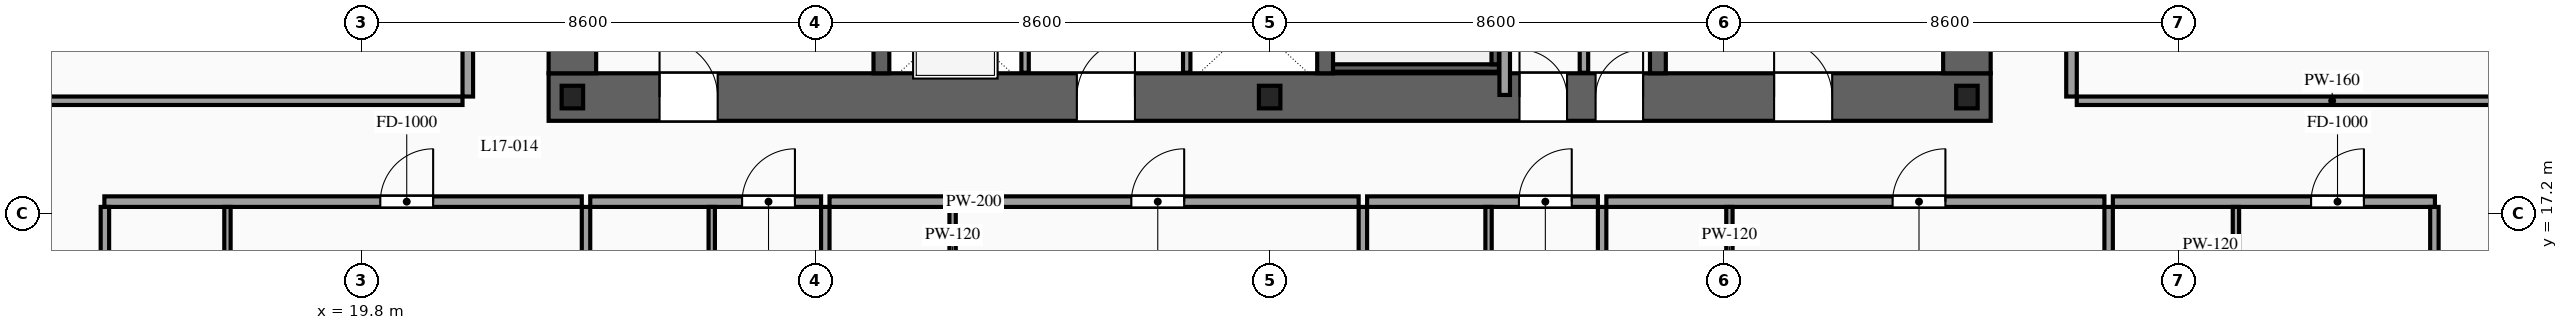
"""IFC4 building model, lengths in metres.
Left out: names, types, materials, properties, quantities, classifications, styles, units other than length and angle.
Written with IfcOpenShell. Run it as: python <this file> out.ifc"""

import sys

from ifc_helpers import new_model, si_unit, direction, frame, frame_2d, origin, origin_2d, place, context, subcontext, project, spatial, rectangle, i_section, extrude, source, transform, mapped, element, fill, save


model = new_model("IFC4")
c1 = context("Model", 3, precision=1e-05, world=origin(), true_north=direction((0.0, 1.0)))
c2 = subcontext(c1, "Body", "Model", "MODEL_VIEW")
j1 = project(units=[si_unit("LENGTHUNIT", "METRE"), si_unit("PLANEANGLEUNIT", "RADIAN")], contexts=[c1])
p1 = place(None, origin())
s1 = spatial("IfcSite", under=j1, at=p1, CompositionType="ELEMENT")
p2 = place(p1, origin())
s2 = spatial("IfcBuilding", under=s1, at=p2, CompositionType="ELEMENT")
p3 = place(p2, frame((0.0, 0.0, 67.6)))
s3 = spatial("IfcBuildingStorey", under=s2, at=p3, CompositionType="ELEMENT", Elevation=67.6)
p4 = place(p3, frame((23.35, 19.4, 0.0), z_axis=(0.0, 0.0, 1.0), x_axis=(1.0, 0.0, 0.0)))
e1 = element("IfcWall", 1, at=p4, inside=s3, PredefinedType="SHEAR", context=c2, shape_type="SweptSolid", body=[
    extrude(rectangle(XDim=27.3, YDim=0.9, at=frame_2d((13.65, 0.0))), origin(), (0.0, 0.0, 1.0), 3.6),
])
p5 = place(p4, frame((2.1, 0.0, 0.0)))
e2 = element("IfcOpeningElement", 2, at=p5, cuts=e1, PredefinedType="OPENING", context=c2, shape_type="SweptSolid", body=[
    extrude(rectangle(XDim=1.1, YDim=2.2, at=frame_2d((0.55, 1.1))), frame((0.0, 0.465, 0.0), z_axis=(0.0, -1.0, 0.0), x_axis=(1.0, 0.0, 0.0)), (0.0, 0.0, 1.0), 0.93),
])
p6 = place(p4, frame((10.0, 0.0, 0.0)))
e3 = element("IfcOpeningElement", 3, at=p6, cuts=e1, PredefinedType="OPENING", context=c2, shape_type="SweptSolid", body=[
    extrude(rectangle(XDim=1.1, YDim=2.2, at=frame_2d((0.55, 1.1))), frame((0.0, 0.465, 0.0), z_axis=(0.0, -1.0, 0.0), x_axis=(1.0, 0.0, 0.0)), (0.0, 0.0, 1.0), 0.93),
])
p7 = place(p4, frame((23.2, 0.0, 0.0)))
e4 = element("IfcOpeningElement", 4, at=p7, cuts=e1, PredefinedType="OPENING", context=c2, shape_type="SweptSolid", body=[
    extrude(rectangle(XDim=1.1, YDim=2.2, at=frame_2d((0.55, 1.1))), frame((0.0, 0.465, 0.0), z_axis=(0.0, -1.0, 0.0), x_axis=(1.0, 0.0, 0.0)), (0.0, 0.0, 1.0), 0.93),
])
p8 = place(p4, frame((19.82, 0.0, 0.0)))
e5 = element("IfcOpeningElement", 5, at=p8, cuts=e1, PredefinedType="OPENING", context=c2, shape_type="SweptSolid", body=[
    extrude(rectangle(XDim=0.9, YDim=2.15, at=frame_2d((0.45, 1.075))), frame((0.0, 0.465, 0.0), z_axis=(0.0, -1.0, 0.0), x_axis=(1.0, 0.0, 0.0)), (0.0, 0.0, 1.0), 0.93),
])
p9 = place(p4, frame((18.38, 0.0, 0.0)))
e6 = element("IfcOpeningElement", 6, at=p9, cuts=e1, PredefinedType="OPENING", context=c2, shape_type="SweptSolid", body=[
    extrude(rectangle(XDim=0.9, YDim=2.15, at=frame_2d((0.45, 1.075))), frame((0.0, 0.465, 0.0), z_axis=(0.0, -1.0, 0.0), x_axis=(1.0, 0.0, 0.0)), (0.0, 0.0, 1.0), 0.93),
])
m1 = source(origin(), c2, "Body", "SweptSolid", [
    extrude(rectangle(XDim=11.9, YDim=0.9, at=frame_2d((5.95, 0.0))), origin(), (0.0, 0.0, 1.0), 3.6),
])
for number, where, z_axis, x_axis in (
    (7, (23.8, 19.85, 0.0), (0.0, 0.0, 1.0), (0.0, 1.0, 0.0)),
    (8, (50.2, 19.85, 0.0), (0.0, 0.0, 1.0), (0.0, 1.0, 0.0)),
):
    element("IfcWall", number, at=place(p3, frame(where, z_axis=z_axis, x_axis=x_axis)), inside=s3, PredefinedType="SHEAR", context=c2, shape_type="MappedRepresentation", body=[
        mapped(m1, transform((0.0, 0.0, 0.0), scale=1.0)),
    ])
m2 = source(origin(), c2, "Body", "SweptSolid", [
    extrude(rectangle(XDim=11.9, YDim=0.3, at=frame_2d((5.95, 0.0))), origin(), (0.0, 0.0, 1.0), 3.6),
])
for number, where, z_axis, x_axis in (
    (9, (29.65, 19.85, 0.0), (0.0, 0.0, 1.0), (0.0, 1.0, 0.0)),
    (10, (38.05, 19.85, 0.0), (0.0, 0.0, 1.0), (0.0, 1.0, 0.0)),
    (11, (44.35, 19.85, 0.0), (0.0, 0.0, 1.0), (0.0, 1.0, 0.0)),
):
    element("IfcWall", number, at=place(p3, frame(where, z_axis=z_axis, x_axis=x_axis)), inside=s3, PredefinedType="SOLIDWALL", context=c2, shape_type="MappedRepresentation", body=[
        mapped(m2, transform((0.0, 0.0, 0.0), scale=1.0)),
    ])
m3 = source(origin(), c2, "Body", "SweptSolid", [
    extrude(i_section(OverallWidth=0.407, OverallDepth=0.428, WebThickness=0.02, FlangeThickness=0.035, at=origin_2d()), origin(), (0.0, 0.0, 1.0), 3.6),
])
for number, where, z_axis, x_axis in (
    (12, (23.8, 19.4, 0.0), (0.0, 0.0, 1.0), (1.0, 0.0, 0.0)),
    (13, (37.0, 19.4, 0.0), (0.0, 0.0, 1.0), (1.0, 0.0, 0.0)),
    (14, (50.2, 19.4, 0.0), (0.0, 0.0, 1.0), (1.0, 0.0, 0.0)),
):
    element("IfcColumn", number, at=place(p3, frame(where, z_axis=z_axis, x_axis=x_axis)), inside=s3, PredefinedType="COLUMN", context=c2, shape_type="MappedRepresentation", body=[
        mapped(m3, transform((0.0, 0.0, 0.0), scale=1.0)),
    ])
p10 = place(p3, frame((32.37, 19.86, 0.0), z_axis=(0.0, 0.0, 1.0), x_axis=(0.0, 1.0, 0.0)))
e15 = element("IfcWall", 15, at=p10, inside=s3, PredefinedType="SOLIDWALL", context=c2, shape_type="SweptSolid", body=[
    extrude(rectangle(XDim=2.04, YDim=0.14, at=frame_2d((1.02, 0.0))), origin(), (0.0, 0.0, 1.0), 3.38),
])
p11 = place(p10, frame((0.47, 0.0, 0.0)))
e16 = element("IfcOpeningElement", 16, at=p11, cuts=e15, PredefinedType="OPENING", context=c2, shape_type="SweptSolid", body=[
    extrude(rectangle(XDim=1.1, YDim=2.2, at=frame_2d((0.55, 1.1))), frame((0.0, 0.085, 0.0), z_axis=(0.0, -1.0, 0.0), x_axis=(1.0, 0.0, 0.0)), (0.0, 0.0, 1.0), 0.17),
])
m4 = source(origin(), c2, "Body", "SweptSolid", [
    extrude(rectangle(XDim=2.04, YDim=0.14, at=frame_2d((1.02, 0.0))), origin(), (0.0, 0.0, 1.0), 3.38),
])
p12 = place(p3, frame((35.43, 19.86, 0.0), z_axis=(0.0, 0.0, 1.0), x_axis=(0.0, 1.0, 0.0)))
e17 = element("IfcWall", 17, at=p12, inside=s3, PredefinedType="SOLIDWALL", context=c2, shape_type="MappedRepresentation", body=[
    mapped(m4, transform((0.0, 0.0, 0.0), scale=1.0)),
])
m5 = source(origin(), c2, "Body", "SweptSolid", [
    extrude(rectangle(XDim=3.14, YDim=0.14, at=frame_2d((1.57, 0.0))), origin(), (0.0, 0.0, 1.0), 3.38),
])
p13 = place(p3, frame((38.2, 19.95, 0.0), z_axis=(0.0, 0.0, 1.0), x_axis=(1.0, 0.0, 0.0)))
e18 = element("IfcWall", 18, at=p13, inside=s3, PredefinedType="SOLIDWALL", context=c2, shape_type="MappedRepresentation", body=[
    mapped(m5, transform((0.0, 0.0, 0.0), scale=1.0)),
])
m6 = source(origin(), c2, "Body", "SweptSolid", [
    extrude(rectangle(XDim=8.94, YDim=0.14, at=frame_2d((4.47, 0.0))), origin(), (0.0, 0.0, 1.0), 3.38),
])
p14 = place(p3, frame((41.27, 20.02, 0.0), z_axis=(0.0, 0.0, 1.0), x_axis=(0.0, 1.0, 0.0)))
e19 = element("IfcWall", 19, at=p14, inside=s3, PredefinedType="SOLIDWALL", context=c2, shape_type="MappedRepresentation", body=[
    mapped(m6, transform((0.0, 0.0, 0.0), scale=1.0)),
])
m7 = source(origin(), c2, "Body", "SweptSolid", [
    extrude(rectangle(XDim=1.34, YDim=0.16, at=frame_2d((0.67, 0.0))), origin(), (0.0, 0.0, 1.0), 3.38),
])
p15 = place(p3, frame((42.95, 19.86, 0.0), z_axis=(0.0, 0.0, 1.0), x_axis=(0.0, 1.0, 0.0)))
e20 = element("IfcWall", 20, at=p15, inside=s3, PredefinedType="PARTITIONING", context=c2, shape_type="MappedRepresentation", body=[
    mapped(m7, transform((0.0, 0.0, 0.0), scale=1.0)),
])
m8 = source(origin(), c2, "Body", "SweptSolid", [
    extrude(rectangle(XDim=6.51, YDim=0.2, at=frame_2d((3.255, 0.0))), origin(), (0.0, 0.0, 1.0), 3.38),
])
p16 = place(p3, frame((41.45, 19.44, 0.0), z_axis=(0.0, 0.0, 1.0), x_axis=(0.0, 1.0, 0.0)))
e21 = element("IfcWall", 21, at=p16, inside=s3, PredefinedType="PARTITIONING", context=c2, shape_type="MappedRepresentation", body=[
    mapped(m8, transform((0.0, 0.0, 0.0), scale=1.0)),
])
p17 = place(p3, frame((14.94, 17.42, 0.0), z_axis=(0.0, 0.0, 1.0), x_axis=(1.0, 0.0, 0.0)))
e22 = element("IfcWall", 22, at=p17, inside=s3, PredefinedType="PARTITIONING", context=c2, shape_type="SweptSolid", body=[
    extrude(rectangle(XDim=9.038, YDim=0.2, at=frame_2d((4.519, 0.0))), origin(), (0.0, 0.0, 1.0), 3.38),
])
p18 = place(p17, frame((5.224, 0.0, 0.0)))
e23 = element("IfcOpeningElement", 23, at=p18, cuts=e22, PredefinedType="OPENING", context=c2, shape_type="SweptSolid", body=[
    extrude(rectangle(XDim=1.0, YDim=2.2, at=frame_2d((0.5, 1.1))), frame((0.0, 0.115, 0.0), z_axis=(0.0, -1.0, 0.0), x_axis=(1.0, 0.0, 0.0)), (0.0, 0.0, 1.0), 0.23),
])
m9 = source(origin(), c2, "Body", "SweptSolid", [
    extrude(rectangle(XDim=16.47, YDim=0.16, at=frame_2d((8.235, 0.0))), origin(), (0.0, 0.0, 1.0), 3.38),
])
p19 = place(p3, frame((24.058, 0.85, 0.0), z_axis=(0.0, 0.0, 1.0), x_axis=(0.0, 1.0, 0.0)))
e24 = element("IfcWall", 24, at=p19, inside=s3, PredefinedType="PARTITIONING", context=c2, shape_type="MappedRepresentation", body=[
    mapped(m9, transform((0.0, 0.0, 0.0), scale=1.0)),
])
m10 = source(origin(), c2, "Body", "SweptSolid", [
    extrude(rectangle(XDim=2.42, YDim=0.12, at=frame_2d((1.21, 0.0))), origin(), (0.0, 0.0, 1.0), 3.38),
])
p20 = place(p3, frame((17.27, 14.9, 0.0), z_axis=(0.0, 0.0, 1.0), x_axis=(0.0, 1.0, 0.0)))
e25 = element("IfcWall", 25, at=p20, inside=s3, PredefinedType="PARTITIONING", context=c2, shape_type="MappedRepresentation", body=[
    mapped(m10, transform((0.0, 0.0, 0.0), scale=1.0)),
])
p21 = place(p3, frame((24.138, 17.42, 0.0), z_axis=(0.0, 0.0, 1.0), x_axis=(1.0, 0.0, 0.0)))
e26 = element("IfcWall", 26, at=p21, inside=s3, PredefinedType="PARTITIONING", context=c2, shape_type="SweptSolid", body=[
    extrude(rectangle(XDim=4.37, YDim=0.2, at=frame_2d((2.185, 0.0))), origin(), (0.0, 0.0, 1.0), 3.38),
])
p22 = place(p21, frame((2.875, 0.0, 0.0)))
e27 = element("IfcOpeningElement", 27, at=p22, cuts=e26, PredefinedType="OPENING", context=c2, shape_type="SweptSolid", body=[
    extrude(rectangle(XDim=1.0, YDim=2.2, at=frame_2d((0.5, 1.1))), frame((0.0, 0.115, 0.0), z_axis=(0.0, -1.0, 0.0), x_axis=(1.0, 0.0, 0.0)), (0.0, 0.0, 1.0), 0.23),
])
p23 = place(p3, frame((28.588, 0.85, 0.0), z_axis=(0.0, 0.0, 1.0), x_axis=(0.0, 1.0, 0.0)))
e28 = element("IfcWall", 28, at=p23, inside=s3, PredefinedType="PARTITIONING", context=c2, shape_type="MappedRepresentation", body=[
    mapped(m9, transform((0.0, 0.0, 0.0), scale=1.0)),
])
p24 = place(p3, frame((26.438, 14.9, 0.0), z_axis=(0.0, 0.0, 1.0), x_axis=(0.0, 1.0, 0.0)))
e29 = element("IfcWall", 29, at=p24, inside=s3, PredefinedType="PARTITIONING", context=c2, shape_type="MappedRepresentation", body=[
    mapped(m10, transform((0.0, 0.0, 0.0), scale=1.0)),
])
p25 = place(p3, frame((28.668, 17.42, 0.0), z_axis=(0.0, 0.0, 1.0), x_axis=(1.0, 0.0, 0.0)))
e30 = element("IfcWall", 30, at=p25, inside=s3, PredefinedType="PARTITIONING", context=c2, shape_type="SweptSolid", body=[
    extrude(rectangle(XDim=10.017, YDim=0.2, at=frame_2d((5.009, 0.0))), origin(), (0.0, 0.0, 1.0), 3.38),
])
p26 = place(p25, frame((5.714, 0.0, 0.0)))
e31 = element("IfcOpeningElement", 31, at=p26, cuts=e30, PredefinedType="OPENING", context=c2, shape_type="SweptSolid", body=[
    extrude(rectangle(XDim=1.0, YDim=2.2, at=frame_2d((0.5, 1.1))), frame((0.0, 0.115, 0.0), z_axis=(0.0, -1.0, 0.0), x_axis=(1.0, 0.0, 0.0)), (0.0, 0.0, 1.0), 0.23),
])
p27 = place(p3, frame((38.765, 0.85, 0.0), z_axis=(0.0, 0.0, 1.0), x_axis=(0.0, 1.0, 0.0)))
e32 = element("IfcWall", 32, at=p27, inside=s3, PredefinedType="PARTITIONING", context=c2, shape_type="MappedRepresentation", body=[
    mapped(m9, transform((0.0, 0.0, 0.0), scale=1.0)),
])
p28 = place(p3, frame((30.998, 14.9, 0.0), z_axis=(0.0, 0.0, 1.0), x_axis=(0.0, 1.0, 0.0)))
e33 = element("IfcWall", 33, at=p28, inside=s3, PredefinedType="PARTITIONING", context=c2, shape_type="MappedRepresentation", body=[
    mapped(m10, transform((0.0, 0.0, 0.0), scale=1.0)),
])
p29 = place(p3, frame((38.845, 17.42, 0.0), z_axis=(0.0, 0.0, 1.0), x_axis=(1.0, 0.0, 0.0)))
e34 = element("IfcWall", 34, at=p29, inside=s3, PredefinedType="PARTITIONING", context=c2, shape_type="SweptSolid", body=[
    extrude(rectangle(XDim=4.369, YDim=0.2, at=frame_2d((2.185, 0.0))), origin(), (0.0, 0.0, 1.0), 3.38),
])
p30 = place(p29, frame((2.874, 0.0, 0.0)))
e35 = element("IfcOpeningElement", 35, at=p30, cuts=e34, PredefinedType="OPENING", context=c2, shape_type="SweptSolid", body=[
    extrude(rectangle(XDim=1.0, YDim=2.2, at=frame_2d((0.5, 1.1))), frame((0.0, 0.115, 0.0), z_axis=(0.0, -1.0, 0.0), x_axis=(1.0, 0.0, 0.0)), (0.0, 0.0, 1.0), 0.23),
])
p31 = place(p3, frame((43.294, 0.85, 0.0), z_axis=(0.0, 0.0, 1.0), x_axis=(0.0, 1.0, 0.0)))
e36 = element("IfcWall", 36, at=p31, inside=s3, PredefinedType="PARTITIONING", context=c2, shape_type="MappedRepresentation", body=[
    mapped(m9, transform((0.0, 0.0, 0.0), scale=1.0)),
])
p32 = place(p3, frame((41.144, 14.9, 0.0), z_axis=(0.0, 0.0, 1.0), x_axis=(0.0, 1.0, 0.0)))
e37 = element("IfcWall", 37, at=p32, inside=s3, PredefinedType="PARTITIONING", context=c2, shape_type="MappedRepresentation", body=[
    mapped(m10, transform((0.0, 0.0, 0.0), scale=1.0)),
])
p33 = place(p3, frame((43.374, 17.42, 0.0), z_axis=(0.0, 0.0, 1.0), x_axis=(1.0, 0.0, 0.0)))
e38 = element("IfcWall", 38, at=p33, inside=s3, PredefinedType="PARTITIONING", context=c2, shape_type="SweptSolid", body=[
    extrude(rectangle(XDim=9.429, YDim=0.2, at=frame_2d((4.714, 0.0))), origin(), (0.0, 0.0, 1.0), 3.38),
])
p34 = place(p33, frame((5.419, 0.0, 0.0)))
e39 = element("IfcOpeningElement", 39, at=p34, cuts=e38, PredefinedType="OPENING", context=c2, shape_type="SweptSolid", body=[
    extrude(rectangle(XDim=1.0, YDim=2.2, at=frame_2d((0.5, 1.1))), frame((0.0, 0.115, 0.0), z_axis=(0.0, -1.0, 0.0), x_axis=(1.0, 0.0, 0.0)), (0.0, 0.0, 1.0), 0.23),
])
p35 = place(p3, frame((52.883, 0.85, 0.0), z_axis=(0.0, 0.0, 1.0), x_axis=(0.0, 1.0, 0.0)))
e40 = element("IfcWall", 40, at=p35, inside=s3, PredefinedType="PARTITIONING", context=c2, shape_type="MappedRepresentation", body=[
    mapped(m9, transform((0.0, 0.0, 0.0), scale=1.0)),
])
p36 = place(p3, frame((45.704, 14.9, 0.0), z_axis=(0.0, 0.0, 1.0), x_axis=(0.0, 1.0, 0.0)))
e41 = element("IfcWall", 41, at=p36, inside=s3, PredefinedType="PARTITIONING", context=c2, shape_type="MappedRepresentation", body=[
    mapped(m10, transform((0.0, 0.0, 0.0), scale=1.0)),
])
p37 = place(p3, frame((52.963, 17.42, 0.0), z_axis=(0.0, 0.0, 1.0), x_axis=(1.0, 0.0, 0.0)))
e42 = element("IfcWall", 42, at=p37, inside=s3, PredefinedType="PARTITIONING", context=c2, shape_type="SweptSolid", body=[
    extrude(rectangle(XDim=6.097, YDim=0.2, at=frame_2d((3.049, 0.0))), origin(), (0.0, 0.0, 1.0), 3.38),
])
p38 = place(p37, frame((3.753, 0.0, 0.0)))
e43 = element("IfcOpeningElement", 43, at=p38, cuts=e42, PredefinedType="OPENING", context=c2, shape_type="SweptSolid", body=[
    extrude(rectangle(XDim=1.0, YDim=2.2, at=frame_2d((0.5, 1.1))), frame((0.0, 0.115, 0.0), z_axis=(0.0, -1.0, 0.0), x_axis=(1.0, 0.0, 0.0)), (0.0, 0.0, 1.0), 0.23),
])
m11 = source(origin(), c2, "Body", "SweptSolid", [
    extrude(rectangle(XDim=16.32, YDim=0.16, at=frame_2d((8.16, 0.0))), origin(), (0.0, 0.0, 1.0), 3.38),
])
for number, where, z_axis, x_axis in (
    (44, (14.95, 1.0, 0.0), (0.0, 0.0, 1.0), (0.0, 1.0, 0.0)),
    (45, (59.05, 1.0, 0.0), (0.0, 0.0, 1.0), (0.0, 1.0, 0.0)),
):
    element("IfcWall", number, at=place(p3, frame(where, z_axis=z_axis, x_axis=x_axis)), inside=s3, PredefinedType="PARTITIONING", context=c2, shape_type="MappedRepresentation", body=[
        mapped(m11, transform((0.0, 0.0, 0.0), scale=1.0)),
    ])
p39 = place(p3, frame((55.293, 14.9, 0.0), z_axis=(0.0, 0.0, 1.0), x_axis=(0.0, 1.0, 0.0)))
e46 = element("IfcWall", 46, at=p39, inside=s3, PredefinedType="PARTITIONING", context=c2, shape_type="MappedRepresentation", body=[
    mapped(m10, transform((0.0, 0.0, 0.0), scale=1.0)),
])
p40 = place(p3, frame((21.82, 19.41, 0.0), z_axis=(0.0, 0.0, 1.0), x_axis=(0.0, 1.0, 0.0)))
e47 = element("IfcWall", 47, at=p40, inside=s3, PredefinedType="PARTITIONING", context=c2, shape_type="SweptSolid", body=[
    extrude(rectangle(XDim=6.31, YDim=0.2, at=frame_2d((3.155, 0.0))), origin(), (0.0, 0.0, 1.0), 3.38),
])
p41 = place(p40, frame((2.655, 0.0, 0.0)))
e48 = element("IfcOpeningElement", 48, at=p41, cuts=e47, PredefinedType="OPENING", context=c2, shape_type="SweptSolid", body=[
    extrude(rectangle(XDim=1.0, YDim=2.2, at=frame_2d((0.5, 1.1))), frame((0.0, 0.115, 0.0), z_axis=(0.0, -1.0, 0.0), x_axis=(1.0, 0.0, 0.0)), (0.0, 0.0, 1.0), 0.23),
])
m12 = source(origin(), c2, "Body", "SweptSolid", [
    extrude(rectangle(XDim=9.67, YDim=0.16, at=frame_2d((4.835, 0.0))), origin(), (0.0, 0.0, 1.0), 2.875),
])
p42 = place(p3, frame((12.05, 19.33, 0.0), z_axis=(0.0, 0.0, 1.0), x_axis=(1.0, 0.0, 0.0)))
e49 = element("IfcWall", 49, at=p42, inside=s3, PredefinedType="PARTITIONING", context=c2, shape_type="MappedRepresentation", body=[
    mapped(m12, transform((0.0, 0.0, 0.0), scale=1.0)),
])
p43 = place(p3, frame((52.18, 19.41, 0.0), z_axis=(0.0, 0.0, 1.0), x_axis=(0.0, 1.0, 0.0)))
e50 = element("IfcWall", 50, at=p43, inside=s3, PredefinedType="PARTITIONING", context=c2, shape_type="SweptSolid", body=[
    extrude(rectangle(XDim=6.31, YDim=0.2, at=frame_2d((3.155, 0.0))), origin(), (0.0, 0.0, 1.0), 3.38),
])
p44 = place(p43, frame((2.655, 0.0, 0.0)))
e51 = element("IfcOpeningElement", 51, at=p44, cuts=e50, PredefinedType="OPENING", context=c2, shape_type="SweptSolid", body=[
    extrude(rectangle(XDim=1.0, YDim=2.2, at=frame_2d((0.5, 1.1))), frame((0.0, 0.115, 0.0), z_axis=(0.0, -1.0, 0.0), x_axis=(1.0, 0.0, 0.0)), (0.0, 0.0, 1.0), 0.23),
])
p45 = place(p3, frame((52.28, 19.33, 0.0), z_axis=(0.0, 0.0, 1.0), x_axis=(1.0, 0.0, 0.0)))
e52 = element("IfcWall", 52, at=p45, inside=s3, PredefinedType="PARTITIONING", context=c2, shape_type="MappedRepresentation", body=[
    mapped(m12, transform((0.0, 0.0, 0.0), scale=1.0)),
])
m13 = source(origin(), c2, "Body", "SweptSolid", [
    extrude(rectangle(XDim=1.1, YDim=2.2, at=frame_2d((0.55, 1.1))), frame((0.0, 0.025, 0.0), z_axis=(0.0, -1.0, 0.0), x_axis=(1.0, 0.0, 0.0)), (0.0, 0.0, 1.0), 0.05),
])
p46 = place(p5, origin())
e53 = element("IfcDoor", 53, at=p46, inside=s3, OperationType="SINGLE_SWING_LEFT", PredefinedType="DOOR", context=c2, shape_type="MappedRepresentation", body=[
    mapped(m13, transform((0.0, 0.0, 0.0), scale=1.0)),
])
fill(e2, e53)
p47 = place(p6, origin())
e54 = element("IfcDoor", 54, at=p47, inside=s3, OperationType="SINGLE_SWING_RIGHT", PredefinedType="DOOR", context=c2, shape_type="MappedRepresentation", body=[
    mapped(m13, transform((0.0, 0.0, 0.0), scale=1.0)),
])
fill(e3, e54)
p48 = place(p7, origin())
e55 = element("IfcDoor", 55, at=p48, inside=s3, OperationType="SINGLE_SWING_LEFT", PredefinedType="DOOR", context=c2, shape_type="MappedRepresentation", body=[
    mapped(m13, transform((0.0, 0.0, 0.0), scale=1.0)),
])
fill(e4, e55)
m14 = source(origin(), c2, "Body", "SweptSolid", [
    extrude(rectangle(XDim=0.9, YDim=2.15, at=frame_2d((0.45, 1.075))), frame((0.0, 0.025, 0.0), z_axis=(0.0, -1.0, 0.0), x_axis=(1.0, 0.0, 0.0)), (0.0, 0.0, 1.0), 0.05),
])
p49 = place(p8, origin())
e56 = element("IfcDoor", 56, at=p49, inside=s3, OperationType="SINGLE_SWING_RIGHT", PredefinedType="DOOR", context=c2, shape_type="MappedRepresentation", body=[
    mapped(m14, transform((0.0, 0.0, 0.0), scale=1.0)),
])
fill(e5, e56)
p50 = place(p9, origin())
e57 = element("IfcDoor", 57, at=p50, inside=s3, OperationType="SINGLE_SWING_LEFT", PredefinedType="DOOR", context=c2, shape_type="MappedRepresentation", body=[
    mapped(m14, transform((0.0, 0.0, 0.0), scale=1.0)),
])
fill(e6, e57)
m15 = source(origin(), c2, "Body", "SweptSolid", [
    extrude(rectangle(XDim=1.0, YDim=2.2, at=frame_2d((0.5, 1.1))), frame((0.0, 0.025, 0.0), z_axis=(0.0, -1.0, 0.0), x_axis=(1.0, 0.0, 0.0)), (0.0, 0.0, 1.0), 0.05),
])
p51 = place(p18, origin())
e58 = element("IfcDoor", 58, at=p51, inside=s3, OperationType="SINGLE_SWING_RIGHT", PredefinedType="DOOR", context=c2, shape_type="MappedRepresentation", body=[
    mapped(m15, transform((0.0, 0.0, 0.0), scale=1.0)),
])
fill(e23, e58)
p52 = place(p22, origin())
e59 = element("IfcDoor", 59, at=p52, inside=s3, OperationType="SINGLE_SWING_RIGHT", PredefinedType="DOOR", context=c2, shape_type="MappedRepresentation", body=[
    mapped(m15, transform((0.0, 0.0, 0.0), scale=1.0)),
])
fill(e27, e59)
p53 = place(p26, origin())
e60 = element("IfcDoor", 60, at=p53, inside=s3, OperationType="SINGLE_SWING_RIGHT", PredefinedType="DOOR", context=c2, shape_type="MappedRepresentation", body=[
    mapped(m15, transform((0.0, 0.0, 0.0), scale=1.0)),
])
fill(e31, e60)
p54 = place(p30, origin())
e61 = element("IfcDoor", 61, at=p54, inside=s3, OperationType="SINGLE_SWING_RIGHT", PredefinedType="DOOR", context=c2, shape_type="MappedRepresentation", body=[
    mapped(m15, transform((0.0, 0.0, 0.0), scale=1.0)),
])
fill(e35, e61)
p55 = place(p34, origin())
e62 = element("IfcDoor", 62, at=p55, inside=s3, OperationType="SINGLE_SWING_RIGHT", PredefinedType="DOOR", context=c2, shape_type="MappedRepresentation", body=[
    mapped(m15, transform((0.0, 0.0, 0.0), scale=1.0)),
])
fill(e39, e62)
p56 = place(p38, origin())
e63 = element("IfcDoor", 63, at=p56, inside=s3, OperationType="SINGLE_SWING_RIGHT", PredefinedType="DOOR", context=c2, shape_type="MappedRepresentation", body=[
    mapped(m15, transform((0.0, 0.0, 0.0), scale=1.0)),
])
fill(e43, e63)
save(model, sys.argv[1])
